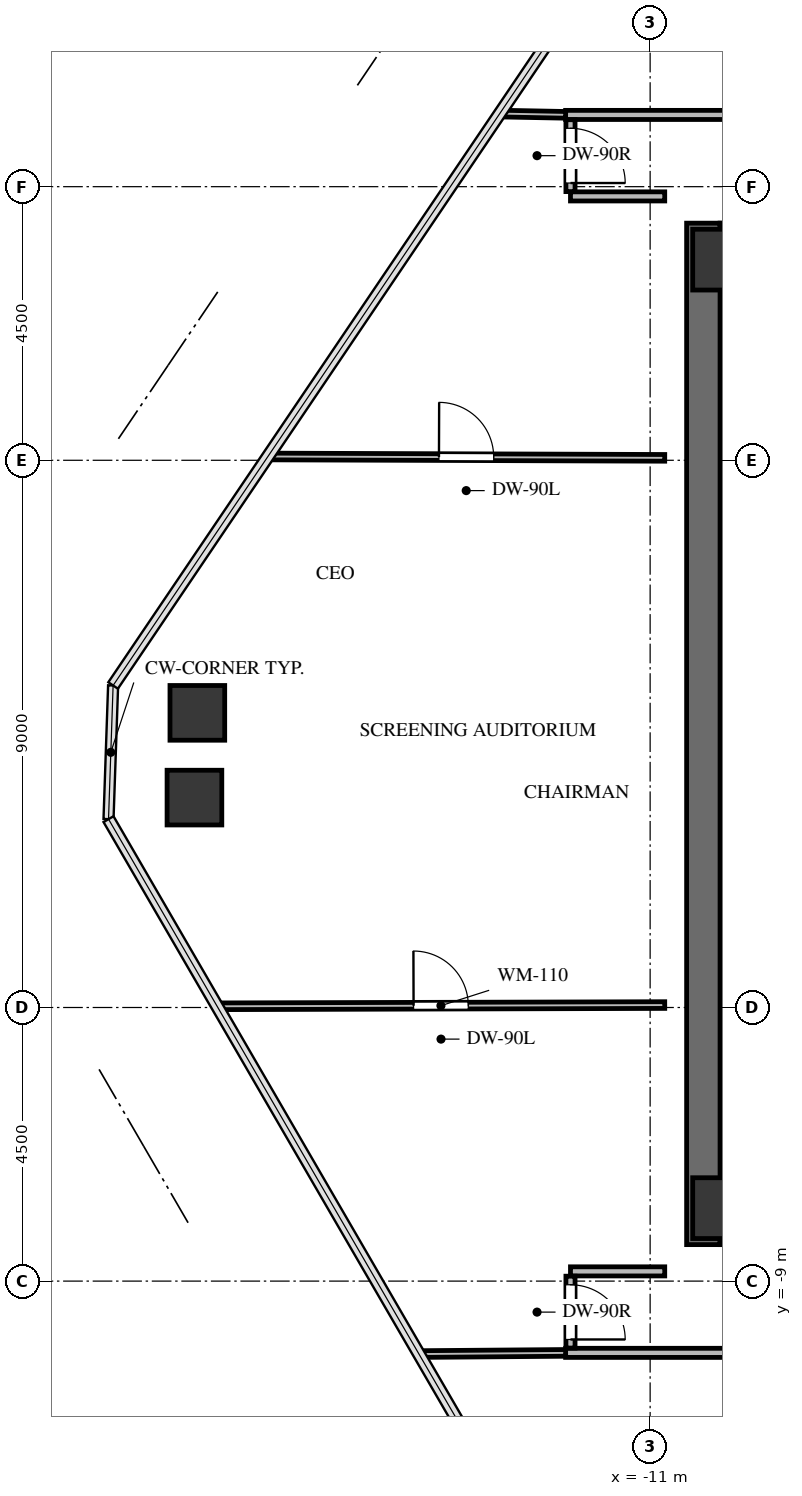
"""IFC4 building model, lengths in metres.
Left out: names, types, materials, properties, quantities, classifications, styles, units other than length and angle.
Written with IfcOpenShell. Run it as: python <this file> out.ifc"""

import sys

from ifc_helpers import new_model, si_unit, direction, frame, frame_2d, origin, origin_2d, place, context, subcontext, project, spatial, rectangle, extrude, source, transform, mapped, element, fill, save


model = new_model("IFC4")
c1 = context("Model", 3, precision=1e-05, world=origin(), true_north=direction((0.0, 1.0)))
c2 = subcontext(c1, "Body", "Model", "MODEL_VIEW")
j1 = project(units=[si_unit("LENGTHUNIT", "METRE"), si_unit("PLANEANGLEUNIT", "RADIAN")], contexts=[c1])
p1 = place(None, origin())
s1 = spatial("IfcSite", under=j1, at=p1, CompositionType="ELEMENT")
p2 = place(p1, origin())
s2 = spatial("IfcBuilding", under=s1, at=p2, CompositionType="ELEMENT")
p3 = place(p2, frame((0.0, 0.0, 261.5)))
s3 = spatial("IfcBuildingStorey", under=s2, at=p3, CompositionType="ELEMENT", Elevation=261.5)
p4 = place(p3, frame((-10.125, -8.4, 0.0), z_axis=(0.0, 0.0, 1.0), x_axis=(0.0, 1.0, 0.0)))
e1 = element("IfcWall", 1, at=p4, inside=s3, PredefinedType="SHEAR", context=c2, shape_type="SweptSolid", body=[
    extrude(rectangle(XDim=16.8, YDim=0.55, at=frame_2d((8.4, 0.0))), origin(), (0.0, 0.0, 1.0), 3.4),
])
p5 = place(p3, frame((-9.85, -8.125, 0.0), z_axis=(0.0, 0.0, 1.0), x_axis=(1.0, 0.0, 0.0)))
e2 = element("IfcWall", 2, at=p5, inside=s3, PredefinedType="SHEAR", context=c2, shape_type="SweptSolid", body=[
    extrude(rectangle(XDim=7.75, YDim=0.55, at=frame_2d((3.875, 0.0))), origin(), (0.0, 0.0, 1.0), 3.4),
])
p6 = place(p3, frame((-9.85, 8.125, 0.0), z_axis=(0.0, 0.0, 1.0), x_axis=(1.0, 0.0, 0.0)))
e3 = element("IfcWall", 3, at=p6, inside=s3, PredefinedType="SHEAR", context=c2, shape_type="SweptSolid", body=[
    extrude(rectangle(XDim=19.7, YDim=0.55, at=frame_2d((9.85, 0.0))), origin(), (0.0, 0.0, 1.0), 3.4),
])
m1 = source(origin(), c2, "Body", "SweptSolid", [
    extrude(rectangle(XDim=1.0, YDim=1.0, at=origin_2d()), origin(), (0.0, 0.0, 1.0), 3.34),
])
for number, where, z_axis, x_axis in (
    (4, (-9.8, -7.8, -0.24), (0.0, 0.0, 1.0), (1.0, 0.0, 0.0)),
    (5, (-9.8, 7.8, -0.24), (0.0, 0.0, 1.0), (1.0, 0.0, 0.0)),
):
    element("IfcColumn", number, at=place(p3, frame(where, z_axis=z_axis, x_axis=x_axis)), inside=s3, PredefinedType="COLUMN", context=c2, shape_type="MappedRepresentation", body=[
        mapped(m1, transform((0.0, 0.0, 0.0), x_axis=(1.0, 0.0, 0.0), y_axis=(0.0, 1.0, 0.0), z_axis=(0.0, 0.0, 1.0), scale=1.0)),
    ])
m2 = source(origin(), c2, "Body", "SweptSolid", [
    extrude(rectangle(XDim=0.9, YDim=0.9, at=origin_2d()), origin(), (0.0, 0.0, 1.0), 3.34),
])
for number, where, z_axis, x_axis in (
    (6, (-18.494, -1.048, -0.24), (0.0, 0.0, 1.0), (1.0, 0.0, 0.0)),
    (7, (-18.446, 0.346, -0.24), (0.0, 0.0, 1.0), (1.0, 0.0, 0.0)),
):
    element("IfcColumn", number, at=place(p3, frame(where, z_axis=z_axis, x_axis=x_axis)), inside=s3, PredefinedType="COLUMN", context=c2, shape_type="MappedRepresentation", body=[
        mapped(m2, transform((0.0, 0.0, 0.0), x_axis=(1.0, 0.0, 0.0), y_axis=(0.0, 1.0, 0.0), z_axis=(0.0, 0.0, 1.0), scale=1.0)),
    ])
p7 = place(p3, frame((-5.56, 10.18, 0.0), z_axis=(0.0, 0.0, 1.0), x_axis=(-1.0, 0.0, 0.0)))
e8 = element("IfcWall", 8, at=p7, inside=s3, PredefinedType="PARTITIONING", context=c2, shape_type="SweptSolid", body=[
    extrude(rectangle(XDim=6.83, YDim=0.15, at=frame_2d((3.415, 0.0))), origin(), (0.0, 0.0, 1.0), 2.341),
])
p8 = place(p7, frame((2.94, 0.0, 0.0)))
e9 = element("IfcOpeningElement", 9, at=p8, cuts=e8, PredefinedType="OPENING", context=c2, shape_type="SweptSolid", body=[
    extrude(rectangle(XDim=0.95, YDim=2.1, at=frame_2d((0.475, 1.05))), frame((0.0, 0.085, 0.0), z_axis=(0.0, -1.0, 0.0), x_axis=(1.0, 0.0, 0.0)), (0.0, 0.0, 1.0), 0.17),
])
p9 = place(p3, frame((-12.39, -10.18, 0.0), z_axis=(0.0, 0.0, 1.0), x_axis=(1.0, 0.0, 0.0)))
e10 = element("IfcWall", 10, at=p9, inside=s3, PredefinedType="PARTITIONING", context=c2, shape_type="SweptSolid", body=[
    extrude(rectangle(XDim=6.63, YDim=0.15, at=frame_2d((3.315, 0.0))), origin(), (0.0, 0.0, 1.0), 3.085),
])
p10 = place(p9, frame((2.84, 0.0, 0.0)))
e11 = element("IfcOpeningElement", 11, at=p10, cuts=e10, PredefinedType="OPENING", context=c2, shape_type="SweptSolid", body=[
    extrude(rectangle(XDim=0.95, YDim=2.1, at=frame_2d((0.475, 1.05))), frame((0.0, 0.085, 0.0), z_axis=(0.0, -1.0, 0.0), x_axis=(1.0, 0.0, 0.0)), (0.0, 0.0, 1.0), 0.17),
])
p11 = place(p3, frame((-10.76, -8.84, 0.0), z_axis=(0.0, 0.0, 1.0), x_axis=(-1.0, 0.0, 0.0)))
e12 = element("IfcWall", 12, at=p11, inside=s3, PredefinedType="PARTITIONING", context=c2, shape_type="SweptSolid", body=[
    extrude(rectangle(XDim=1.55, YDim=0.15, at=frame_2d((0.775, 0.0))), origin(), (0.0, 0.0, 1.0), 3.085),
])
p12 = place(p3, frame((-12.31, -8.919, 0.0), z_axis=(0.0, 0.0, 1.0), x_axis=(0.0, -1.0, 0.0)))
e13 = element("IfcWall", 13, at=p12, inside=s3, PredefinedType="PARTITIONING", context=c2, shape_type="SweptSolid", body=[
    extrude(rectangle(XDim=1.182, YDim=0.15, at=frame_2d((0.591, 0.0))), origin(), (0.0, 0.0, 1.0), 3.085),
])
p13 = place(p12, frame((0.141, 0.0, 0.0)))
e14 = element("IfcOpeningElement", 14, at=p13, cuts=e13, PredefinedType="OPENING", context=c2, shape_type="SweptSolid", body=[
    extrude(rectangle(XDim=0.9, YDim=2.05, at=frame_2d((0.45, 1.025))), frame((0.0, 0.085, 0.0), z_axis=(0.0, -1.0, 0.0), x_axis=(1.0, 0.0, 0.0)), (0.0, 0.0, 1.0), 0.17),
])
p14 = place(p3, frame((-12.31, 8.84, 0.0), z_axis=(0.0, 0.0, 1.0), x_axis=(1.0, 0.0, 0.0)))
e15 = element("IfcWall", 15, at=p14, inside=s3, PredefinedType="PARTITIONING", context=c2, shape_type="SweptSolid", body=[
    extrude(rectangle(XDim=1.55, YDim=0.15, at=frame_2d((0.775, 0.0))), origin(), (0.0, 0.0, 1.0), 3.085),
])
p15 = place(p3, frame((-12.31, 10.101, 0.0), z_axis=(0.0, 0.0, 1.0), x_axis=(0.0, -1.0, 0.0)))
e16 = element("IfcWall", 16, at=p15, inside=s3, PredefinedType="PARTITIONING", context=c2, shape_type="SweptSolid", body=[
    extrude(rectangle(XDim=1.182, YDim=0.15, at=frame_2d((0.591, 0.0))), origin(), (0.0, 0.0, 1.0), 2.439),
])
p16 = place(p15, frame((0.141, 0.0, 0.0)))
e17 = element("IfcOpeningElement", 17, at=p16, cuts=e16, PredefinedType="OPENING", context=c2, shape_type="SweptSolid", body=[
    extrude(rectangle(XDim=0.9, YDim=2.05, at=frame_2d((0.45, 1.025))), frame((0.0, 0.085, 0.0), z_axis=(0.0, -1.0, 0.0), x_axis=(1.0, 0.0, 0.0)), (0.0, 0.0, 1.0), 0.17),
])
p17 = place(p3, frame((-12.39, 10.181, 0.0), z_axis=(0.0, 0.0, 1.0), x_axis=(-0.999812128272, 0.019383192748, 0.0)))
e18 = element("IfcWall", 18, at=p17, inside=s3, PredefinedType="MOVABLE", context=c2, shape_type="SweptSolid", body=[
    extrude(rectangle(XDim=1.083, YDim=0.11, at=frame_2d((0.542, 0.0))), origin(), (0.0, 0.0, 1.0), 3.085),
])
p18 = place(p3, frame((-14.802, -10.2, 0.0), z_axis=(0.0, 0.0, 1.0), x_axis=(0.999968020968, 0.007997314604, 0.0)))
e19 = element("IfcWall", 19, at=p18, inside=s3, PredefinedType="MOVABLE", context=c2, shape_type="SweptSolid", body=[
    extrude(rectangle(XDim=2.412, YDim=0.11, at=frame_2d((1.206, 0.0))), origin(), (0.0, 0.0, 1.0), 2.439),
])
p19 = place(p3, frame((-18.121, -4.48, 0.0), z_axis=(0.0, 0.0, 1.0), x_axis=(0.999996301788, 0.002719634398, 0.0)))
e20 = element("IfcWall", 20, at=p19, inside=s3, PredefinedType="MOVABLE", context=c2, shape_type="SweptSolid", body=[
    extrude(rectangle(XDim=7.361, YDim=0.11, at=frame_2d((3.681, 0.0))), origin(), (0.0, 0.0, 1.0), 2.439),
])
p20 = place(p19, frame((3.231, 0.0, 0.0)))
e21 = element("IfcOpeningElement", 21, at=p20, cuts=e20, PredefinedType="OPENING", context=c2, shape_type="SweptSolid", body=[
    extrude(rectangle(XDim=0.9, YDim=2.05, at=frame_2d((0.45, 1.025))), frame((0.0, 0.065, 0.0), z_axis=(0.0, -1.0, 0.0), x_axis=(1.0, 0.0, 0.0)), (0.0, 0.0, 1.0), 0.13),
])
p21 = place(p3, frame((-17.286, 4.562, 0.0), z_axis=(0.0, 0.0, 1.0), x_axis=(0.999994076971, -0.003441805278, 0.0)))
e22 = element("IfcWall", 22, at=p21, inside=s3, PredefinedType="MOVABLE", context=c2, shape_type="SweptSolid", body=[
    extrude(rectangle(XDim=6.526, YDim=0.11, at=frame_2d((3.263, 0.0))), origin(), (0.0, 0.0, 1.0), 2.439),
])
p22 = place(p21, frame((2.813, 0.0, 0.0)))
e23 = element("IfcOpeningElement", 23, at=p22, cuts=e22, PredefinedType="OPENING", context=c2, shape_type="SweptSolid", body=[
    extrude(rectangle(XDim=0.9, YDim=2.05, at=frame_2d((0.45, 1.025))), frame((0.0, 0.065, 0.0), z_axis=(0.0, -1.0, 0.0), x_axis=(1.0, 0.0, 0.0)), (0.0, 0.0, 1.0), 0.13),
])
m3 = source(origin(), c2, "Body", "SweptSolid", [
    extrude(rectangle(XDim=0.9, YDim=2.05, at=frame_2d((0.45, 1.025))), frame((0.0, 0.025, 0.0), z_axis=(0.0, -1.0, 0.0), x_axis=(1.0, 0.0, 0.0)), (0.0, 0.0, 1.0), 0.05),
])
p23 = place(p13, origin())
e24 = element("IfcDoor", 24, at=p23, inside=s3, OperationType="SINGLE_SWING_RIGHT", PredefinedType="DOOR", context=c2, shape_type="MappedRepresentation", body=[
    mapped(m3, transform((0.0, 0.0, 0.0), x_axis=(1.0, 0.0, 0.0), y_axis=(0.0, 1.0, 0.0), z_axis=(0.0, 0.0, 1.0), scale=1.0)),
])
fill(e14, e24)
p24 = place(p16, origin())
e25 = element("IfcDoor", 25, at=p24, inside=s3, OperationType="SINGLE_SWING_RIGHT", PredefinedType="DOOR", context=c2, shape_type="MappedRepresentation", body=[
    mapped(m3, transform((0.0, 0.0, 0.0), x_axis=(1.0, 0.0, 0.0), y_axis=(0.0, 1.0, 0.0), z_axis=(0.0, 0.0, 1.0), scale=1.0)),
])
fill(e17, e25)
m4 = source(origin(), c2, "Body", "SweptSolid", [
    extrude(rectangle(XDim=0.9, YDim=2.05, at=frame_2d((0.45, 1.025))), frame((0.0, 0.025, 0.0), z_axis=(0.0, -1.0, 0.0), x_axis=(1.0, 0.0, 0.0)), (0.0, 0.0, 1.0), 0.05),
])
p25 = place(p20, origin())
e26 = element("IfcDoor", 26, at=p25, inside=s3, OperationType="SINGLE_SWING_LEFT", PredefinedType="DOOR", context=c2, shape_type="MappedRepresentation", body=[
    mapped(m4, transform((0.0, 0.0, 0.0), x_axis=(1.0, 0.0, 0.0), y_axis=(0.0, 1.0, 0.0), z_axis=(0.0, 0.0, 1.0), scale=1.0)),
])
fill(e21, e26)
p26 = place(p22, origin())
e27 = element("IfcDoor", 27, at=p26, inside=s3, OperationType="SINGLE_SWING_LEFT", PredefinedType="DOOR", context=c2, shape_type="MappedRepresentation", body=[
    mapped(m4, transform((0.0, 0.0, 0.0), x_axis=(1.0, 0.0, 0.0), y_axis=(0.0, 1.0, 0.0), z_axis=(0.0, 0.0, 1.0), scale=1.0)),
])
fill(e23, e27)
save(model, sys.argv[1])
